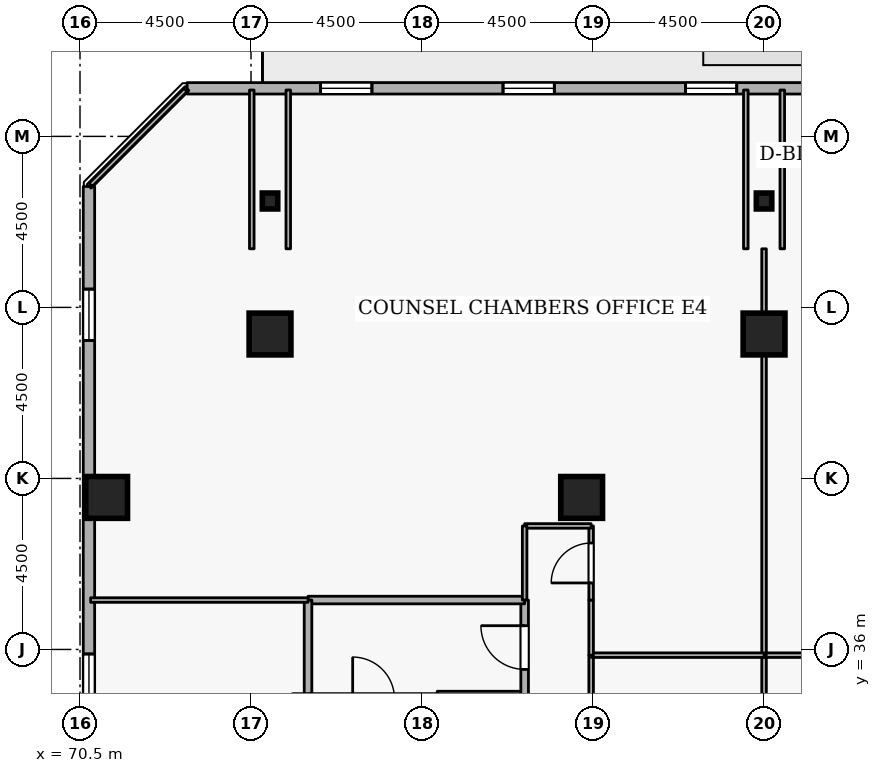
"""IFC4 building model, lengths in metres.
Left out: names, types, materials, properties, quantities, classifications, styles, units other than length and angle.
Written with IfcOpenShell. Run it as: python <this file> out.ifc"""

import sys

from ifc_helpers import new_model, si_unit, direction, frame, frame_2d, origin, origin_2d, place, context, subcontext, project, spatial, rectangle, i_section, extrude, element, fill, save


model = new_model("IFC4")
c1 = context("Model", 3, precision=1e-05, world=origin(), true_north=direction((0.0, 1.0)))
c2 = subcontext(c1, "Body", "Model", "MODEL_VIEW")
j1 = project(units=[si_unit("LENGTHUNIT", "METRE"), si_unit("PLANEANGLEUNIT", "RADIAN")], contexts=[c1])
p1 = place(None, origin())
s1 = spatial("IfcSite", under=j1, at=p1, CompositionType="ELEMENT")
p2 = place(p1, origin())
s2 = spatial("IfcBuilding", under=s1, at=p2, CompositionType="ELEMENT")
p3 = place(p2, frame((0.0, 0.0, 170.7)))
s3 = spatial("IfcBuildingStorey", under=s2, at=p3, CompositionType="ELEMENT", Elevation=170.7)
for number, where, z_axis, x_axis in (
    (1, (88.5, 44.3, 0.0), (0.0, 0.0, 1.0), (1.0, 0.0, 0.0)),
    (2, (75.5, 44.3, 0.0), (0.0, 0.0, 1.0), (1.0, 0.0, 0.0)),
    (3, (71.2, 40.0, 0.0), (0.0, 0.0, 1.0), (1.0, 0.0, 0.0)),
    (4, (83.7, 40.0, 0.0), (0.0, 0.0, 1.0), (1.0, 0.0, 0.0)),
):
    element("IfcColumn", number, at=place(p3, frame(where, z_axis=z_axis, x_axis=x_axis)), inside=s3, PredefinedType="COLUMN", context=c2, shape_type="SweptSolid", body=[
        extrude(rectangle(XDim=1.1, YDim=1.1, at=origin_2d()), origin(), (0.0, 0.0, 1.0), 3.6),
    ])
for number, where, z_axis, x_axis in (
    (5, (88.5, 47.8, 0.0), (0.0, 0.0, 1.0), (1.0, 0.0, 0.0)),
    (6, (75.5, 47.8, 0.0), (0.0, 0.0, 1.0), (1.0, 0.0, 0.0)),
):
    element("IfcColumn", number, at=place(p3, frame(where, z_axis=z_axis, x_axis=x_axis)), inside=s3, PredefinedType="COLUMN", context=c2, shape_type="SweptSolid", body=[
        extrude(i_section(OverallWidth=0.407, OverallDepth=0.419, WebThickness=0.031, FlangeThickness=0.049, FilletRadius=0.015, at=origin_2d()), origin(), (0.0, 0.0, 1.0), 3.6),
    ])
p4 = place(p3, frame((109.681, 50.765, 0.0), z_axis=(0.0, 0.0, 1.0), x_axis=(-1.0, 0.0, 0.0)))
e7 = element("IfcWall", 7, at=p4, inside=s3, PredefinedType="STANDARD", context=c2, shape_type="SweptSolid", body=[
    extrude(rectangle(XDim=36.363, YDim=0.3, at=frame_2d((18.181, 0.0))), origin(), (0.0, 0.0, 1.0), 2.22),
])
p5 = place(p4, frame((19.081, 0.0, 0.0)))
e8 = element("IfcOpeningElement", 8, at=p5, cuts=e7, PredefinedType="OPENING", context=c2, shape_type="SweptSolid", body=[
    extrude(rectangle(XDim=1.0, YDim=2.08, at=frame_2d((0.5, 1.04))), frame((0.0, 0.16, 0.0), z_axis=(0.0, -1.0, 0.0), x_axis=(1.0, 0.0, 0.0)), (0.0, 0.0, 1.0), 0.32),
])
p6 = place(p4, frame((2.7, 0.0, 0.72)))
e9 = element("IfcOpeningElement", 9, at=p6, cuts=e7, PredefinedType="OPENING", context=c2, shape_type="SweptSolid", body=[
    extrude(rectangle(XDim=1.35, YDim=1.05, at=frame_2d((0.675, 0.525))), frame((0.0, 0.16, 0.0), z_axis=(0.0, -1.0, 0.0), x_axis=(1.0, 0.0, 0.0)), (0.0, 0.0, 1.0), 0.32),
])
p7 = place(p4, frame((12.3, 0.0, 0.72)))
e10 = element("IfcOpeningElement", 10, at=p7, cuts=e7, PredefinedType="OPENING", context=c2, shape_type="SweptSolid", body=[
    extrude(rectangle(XDim=1.35, YDim=1.05, at=frame_2d((0.675, 0.525))), frame((0.0, 0.16, 0.0), z_axis=(0.0, -1.0, 0.0), x_axis=(1.0, 0.0, 0.0)), (0.0, 0.0, 1.0), 0.32),
])
p8 = place(p4, frame((17.1, 0.0, 0.72)))
e11 = element("IfcOpeningElement", 11, at=p8, cuts=e7, PredefinedType="OPENING", context=c2, shape_type="SweptSolid", body=[
    extrude(rectangle(XDim=1.35, YDim=1.05, at=frame_2d((0.675, 0.525))), frame((0.0, 0.16, 0.0), z_axis=(0.0, -1.0, 0.0), x_axis=(1.0, 0.0, 0.0)), (0.0, 0.0, 1.0), 0.32),
])
p9 = place(p4, frame((21.9, 0.0, 0.72)))
e12 = element("IfcOpeningElement", 12, at=p9, cuts=e7, PredefinedType="OPENING", context=c2, shape_type="SweptSolid", body=[
    extrude(rectangle(XDim=1.35, YDim=1.05, at=frame_2d((0.675, 0.525))), frame((0.0, 0.16, 0.0), z_axis=(0.0, -1.0, 0.0), x_axis=(1.0, 0.0, 0.0)), (0.0, 0.0, 1.0), 0.32),
])
p10 = place(p4, frame((26.7, 0.0, 0.72)))
e13 = element("IfcOpeningElement", 13, at=p10, cuts=e7, PredefinedType="OPENING", context=c2, shape_type="SweptSolid", body=[
    extrude(rectangle(XDim=1.35, YDim=1.05, at=frame_2d((0.675, 0.525))), frame((0.0, 0.16, 0.0), z_axis=(0.0, -1.0, 0.0), x_axis=(1.0, 0.0, 0.0)), (0.0, 0.0, 1.0), 0.32),
])
p11 = place(p4, frame((31.5, 0.0, 0.72)))
e14 = element("IfcOpeningElement", 14, at=p11, cuts=e7, PredefinedType="OPENING", context=c2, shape_type="SweptSolid", body=[
    extrude(rectangle(XDim=1.35, YDim=1.05, at=frame_2d((0.675, 0.525))), frame((0.0, 0.16, 0.0), z_axis=(0.0, -1.0, 0.0), x_axis=(1.0, 0.0, 0.0)), (0.0, 0.0, 1.0), 0.32),
])
p12 = place(p3, frame((70.735, 48.181, 0.0), z_axis=(0.0, 0.0, 1.0), x_axis=(0.0, -1.0, 0.0)))
e15 = element("IfcWall", 15, at=p12, inside=s3, PredefinedType="STANDARD", context=c2, shape_type="SweptSolid", body=[
    extrude(rectangle(XDim=36.363, YDim=0.3, at=frame_2d((18.181, 0.0))), origin(), (0.0, 0.0, 1.0), 2.22),
])
p13 = place(p12, frame((2.7, 0.0, 0.72)))
e16 = element("IfcOpeningElement", 16, at=p13, cuts=e15, PredefinedType="OPENING", context=c2, shape_type="SweptSolid", body=[
    extrude(rectangle(XDim=1.35, YDim=1.05, at=frame_2d((0.675, 0.525))), frame((0.0, 0.16, 0.0), z_axis=(0.0, -1.0, 0.0), x_axis=(1.0, 0.0, 0.0)), (0.0, 0.0, 1.0), 0.32),
])
p14 = place(p12, frame((12.3, 0.0, 0.72)))
e17 = element("IfcOpeningElement", 17, at=p14, cuts=e15, PredefinedType="OPENING", context=c2, shape_type="SweptSolid", body=[
    extrude(rectangle(XDim=1.35, YDim=1.05, at=frame_2d((0.675, 0.525))), frame((0.0, 0.16, 0.0), z_axis=(0.0, -1.0, 0.0), x_axis=(1.0, 0.0, 0.0)), (0.0, 0.0, 1.0), 0.32),
])
p15 = place(p12, frame((17.1, 0.0, 0.72)))
e18 = element("IfcOpeningElement", 18, at=p15, cuts=e15, PredefinedType="OPENING", context=c2, shape_type="SweptSolid", body=[
    extrude(rectangle(XDim=1.35, YDim=1.05, at=frame_2d((0.675, 0.525))), frame((0.0, 0.16, 0.0), z_axis=(0.0, -1.0, 0.0), x_axis=(1.0, 0.0, 0.0)), (0.0, 0.0, 1.0), 0.32),
])
p16 = place(p12, frame((26.7, 0.0, 0.72)))
e19 = element("IfcOpeningElement", 19, at=p16, cuts=e15, PredefinedType="OPENING", context=c2, shape_type="SweptSolid", body=[
    extrude(rectangle(XDim=1.35, YDim=1.05, at=frame_2d((0.675, 0.525))), frame((0.0, 0.16, 0.0), z_axis=(0.0, -1.0, 0.0), x_axis=(1.0, 0.0, 0.0)), (0.0, 0.0, 1.0), 0.32),
])
p17 = place(p3, frame((79.9, 34.8, 0.0), z_axis=(0.0, 0.0, 1.0), x_axis=(1.0, 0.0, 0.0)))
e20 = element("IfcWall", 20, at=p17, inside=s3, PredefinedType="STANDARD", context=c2, shape_type="SweptSolid", body=[
    extrude(rectangle(XDim=2.3, YDim=0.2, at=frame_2d((1.15, 0.0))), origin(), (0.0, 0.0, 1.0), 2.465),
])
p18 = place(p3, frame((82.2, 34.8, 0.0), z_axis=(0.0, 0.0, 1.0), x_axis=(0.0, 1.0, 0.0)))
e21 = element("IfcWall", 21, at=p18, inside=s3, PredefinedType="STANDARD", context=c2, shape_type="SweptSolid", body=[
    extrude(rectangle(XDim=2.5, YDim=0.2, at=frame_2d((1.25, 0.0))), origin(), (0.0, 0.0, 1.0), 3.26),
])
p19 = place(p18, frame((0.675, 0.0, 0.0)))
e22 = element("IfcOpeningElement", 22, at=p19, cuts=e21, PredefinedType="OPENING", context=c2, shape_type="SweptSolid", body=[
    extrude(rectangle(XDim=1.15, YDim=2.1, at=frame_2d((0.575, 1.05))), frame((0.0, 0.11, 0.0), z_axis=(0.0, -1.0, 0.0), x_axis=(1.0, 0.0, 0.0)), (0.0, 0.0, 1.0), 0.22),
])
p20 = place(p3, frame((82.2, 37.3, 0.0), z_axis=(0.0, 0.0, 1.0), x_axis=(-1.0, 0.0, 0.0)))
e23 = element("IfcWall", 23, at=p20, inside=s3, PredefinedType="STANDARD", context=c2, shape_type="SweptSolid", body=[
    extrude(rectangle(XDim=5.7, YDim=0.2, at=frame_2d((2.85, 0.0))), origin(), (0.0, 0.0, 1.0), 3.26),
])
p21 = place(p3, frame((76.5, 37.3, 0.0), z_axis=(0.0, 0.0, 1.0), x_axis=(0.0, -1.0, 0.0)))
e24 = element("IfcWall", 24, at=p21, inside=s3, PredefinedType="STANDARD", context=c2, shape_type="SweptSolid", body=[
    extrude(rectangle(XDim=2.5, YDim=0.2, at=frame_2d((1.25, 0.0))), origin(), (0.0, 0.0, 1.0), 3.26),
])
p22 = place(p3, frame((88.5, 33.95, 0.0), z_axis=(0.0, 0.0, 1.0), x_axis=(0.0, 1.0, 0.0)))
e25 = element("IfcWall", 25, at=p22, inside=s3, PredefinedType="PARTITIONING", context=c2, shape_type="SweptSolid", body=[
    extrude(rectangle(XDim=1.9, YDim=0.12, at=frame_2d((0.95, 0.0))), origin(), (0.0, 0.0, 1.0), 1.785),
])
p23 = place(p3, frame((88.5, 35.85, 0.0), z_axis=(0.0, 0.0, 1.0), x_axis=(1.0, 0.0, 0.0)))
e26 = element("IfcWall", 26, at=p23, inside=s3, PredefinedType="PARTITIONING", context=c2, shape_type="SweptSolid", body=[
    extrude(rectangle(XDim=4.55, YDim=0.12, at=frame_2d((2.275, 0.0))), origin(), (0.0, 0.0, 1.0), 3.26),
])
p24 = place(p3, frame((88.5, 35.85, 0.0), z_axis=(0.0, 0.0, 1.0), x_axis=(0.0, 1.0, 0.0)))
e27 = element("IfcWall", 27, at=p24, inside=s3, PredefinedType="PARTITIONING", context=c2, shape_type="SweptSolid", body=[
    extrude(rectangle(XDim=10.692, YDim=0.12, at=frame_2d((5.346, 0.0))), origin(), (0.0, 0.0, 1.0), 1.785),
])
p25 = place(p3, frame((88.98, 46.542, 0.0), z_axis=(0.0, 0.0, 1.0), x_axis=(0.0, 1.0, 0.0)))
e28 = element("IfcWall", 28, at=p25, inside=s3, PredefinedType="PARTITIONING", context=c2, shape_type="SweptSolid", body=[
    extrude(rectangle(XDim=4.178, YDim=0.12, at=frame_2d((2.089, 0.0))), origin(), (0.0, 0.0, 1.0), 1.785),
])
p26 = place(p3, frame((83.95, 33.95, 0.0), z_axis=(0.0, 0.0, 1.0), x_axis=(0.0, 1.0, 0.0)))
e29 = element("IfcWall", 29, at=p26, inside=s3, PredefinedType="PARTITIONING", context=c2, shape_type="SweptSolid", body=[
    extrude(rectangle(XDim=1.9, YDim=0.12, at=frame_2d((0.95, 0.0))), origin(), (0.0, 0.0, 1.0), 3.26),
])
p27 = place(p3, frame((83.95, 35.85, 0.0), z_axis=(0.0, 0.0, 1.0), x_axis=(1.0, 0.0, 0.0)))
e30 = element("IfcWall", 30, at=p27, inside=s3, PredefinedType="PARTITIONING", context=c2, shape_type="SweptSolid", body=[
    extrude(rectangle(XDim=4.55, YDim=0.12, at=frame_2d((2.275, 0.0))), origin(), (0.0, 0.0, 1.0), 3.26),
])
p28 = place(p3, frame((83.95, 35.85, 0.0), z_axis=(0.0, 0.0, 1.0), x_axis=(0.0, 1.0, 0.0)))
e31 = element("IfcWall", 31, at=p28, inside=s3, PredefinedType="PARTITIONING", context=c2, shape_type="SweptSolid", body=[
    extrude(rectangle(XDim=1.45, YDim=0.12, at=frame_2d((0.725, 0.0))), origin(), (0.0, 0.0, 1.0), 3.26),
])
p29 = place(p3, frame((83.95, 37.3, 0.0), z_axis=(0.0, 0.0, 1.0), x_axis=(0.0, 1.0, 0.0)))
e32 = element("IfcWall", 32, at=p29, inside=s3, PredefinedType="PARTITIONING", context=c2, shape_type="SweptSolid", body=[
    extrude(rectangle(XDim=1.95, YDim=0.12, at=frame_2d((0.975, 0.0))), origin(), (0.0, 0.0, 1.0), 3.26),
])
p30 = place(p29, frame((0.45, 0.0, 0.0)))
e33 = element("IfcOpeningElement", 33, at=p30, cuts=e32, PredefinedType="OPENING", context=c2, shape_type="SweptSolid", body=[
    extrude(rectangle(XDim=1.05, YDim=2.1, at=frame_2d((0.525, 1.05))), frame((0.0, 0.07, 0.0), z_axis=(0.0, -1.0, 0.0), x_axis=(1.0, 0.0, 0.0)), (0.0, 0.0, 1.0), 0.14),
])
p31 = place(p3, frame((83.95, 39.25, 0.0), z_axis=(0.0, 0.0, 1.0), x_axis=(-1.0, 0.0, 0.0)))
e34 = element("IfcWall", 34, at=p31, inside=s3, PredefinedType="PARTITIONING", context=c2, shape_type="SweptSolid", body=[
    extrude(rectangle(XDim=1.75, YDim=0.12, at=frame_2d((0.875, 0.0))), origin(), (0.0, 0.0, 1.0), 3.26),
])
p32 = place(p3, frame((82.2, 39.25, 0.0), z_axis=(0.0, 0.0, 1.0), x_axis=(0.0, -1.0, 0.0)))
e35 = element("IfcWall", 35, at=p32, inside=s3, PredefinedType="PARTITIONING", context=c2, shape_type="SweptSolid", body=[
    extrude(rectangle(XDim=1.95, YDim=0.12, at=frame_2d((0.975, 0.0))), origin(), (0.0, 0.0, 1.0), 3.26),
])
p33 = place(p3, frame((76.5, 37.3, 0.0), z_axis=(0.0, 0.0, 1.0), x_axis=(-1.0, 0.0, 0.0)))
e36 = element("IfcWall", 36, at=p33, inside=s3, PredefinedType="PARTITIONING", context=c2, shape_type="SweptSolid", body=[
    extrude(rectangle(XDim=5.72, YDim=0.12, at=frame_2d((2.86, 0.0))), origin(), (0.0, 0.0, 1.0), 3.26),
])
p34 = place(p3, frame((70.78, 48.225, 0.0), z_axis=(0.0, 0.0, 1.0), x_axis=(0.707106781187, 0.707106781187, 0.0)))
e37 = element("IfcWall", 37, at=p34, inside=s3, PredefinedType="PARTITIONING", context=c2, shape_type="SweptSolid", body=[
    extrude(rectangle(XDim=3.528, YDim=0.12, at=frame_2d((1.764, 0.0))), origin(), (0.0, 0.0, 1.0), 3.26),
])
for number, where, z_axis, x_axis in (
    (38, (75.02, 50.72, 0.0), (0.0, 0.0, 1.0), (0.0, -1.0, 0.0)),
    (39, (75.98, 46.542, 0.0), (0.0, 0.0, 1.0), (0.0, 1.0, 0.0)),
    (40, (88.02, 50.72, 0.0), (0.0, 0.0, 1.0), (0.0, -1.0, 0.0)),
):
    element("IfcWall", number, at=place(p3, frame(where, z_axis=z_axis, x_axis=x_axis)), inside=s3, PredefinedType="PARTITIONING", context=c2, shape_type="SweptSolid", body=[
        extrude(rectangle(XDim=4.178, YDim=0.12, at=frame_2d((2.089, 0.0))), origin(), (0.0, 0.0, 1.0), 1.785),
    ])
p35 = place(p9, origin())
e41 = element("IfcWindow", 41, at=p35, inside=s3, PartitioningType="SINGLE_PANEL", PredefinedType="WINDOW", context=c2, shape_type="SweptSolid", body=[
    extrude(rectangle(XDim=1.35, YDim=1.05, at=frame_2d((0.675, 0.525))), frame((0.0, 0.03, 0.0), z_axis=(0.0, -1.0, 0.0), x_axis=(1.0, 0.0, 0.0)), (0.0, 0.0, 1.0), 0.06),
])
fill(e12, e41)
p36 = place(p10, origin())
e42 = element("IfcWindow", 42, at=p36, inside=s3, PartitioningType="SINGLE_PANEL", PredefinedType="WINDOW", context=c2, shape_type="SweptSolid", body=[
    extrude(rectangle(XDim=1.35, YDim=1.05, at=frame_2d((0.675, 0.525))), frame((0.0, 0.03, 0.0), z_axis=(0.0, -1.0, 0.0), x_axis=(1.0, 0.0, 0.0)), (0.0, 0.0, 1.0), 0.06),
])
fill(e13, e42)
p37 = place(p11, origin())
e43 = element("IfcWindow", 43, at=p37, inside=s3, PartitioningType="SINGLE_PANEL", PredefinedType="WINDOW", context=c2, shape_type="SweptSolid", body=[
    extrude(rectangle(XDim=1.35, YDim=1.05, at=frame_2d((0.675, 0.525))), frame((0.0, 0.03, 0.0), z_axis=(0.0, -1.0, 0.0), x_axis=(1.0, 0.0, 0.0)), (0.0, 0.0, 1.0), 0.06),
])
fill(e14, e43)
p38 = place(p13, origin())
e44 = element("IfcWindow", 44, at=p38, inside=s3, PartitioningType="SINGLE_PANEL", PredefinedType="WINDOW", context=c2, shape_type="SweptSolid", body=[
    extrude(rectangle(XDim=1.35, YDim=1.05, at=frame_2d((0.675, 0.525))), frame((0.0, 0.03, 0.0), z_axis=(0.0, -1.0, 0.0), x_axis=(1.0, 0.0, 0.0)), (0.0, 0.0, 1.0), 0.06),
])
fill(e16, e44)
p39 = place(p14, origin())
e45 = element("IfcWindow", 45, at=p39, inside=s3, PartitioningType="SINGLE_PANEL", PredefinedType="WINDOW", context=c2, shape_type="SweptSolid", body=[
    extrude(rectangle(XDim=1.35, YDim=1.05, at=frame_2d((0.675, 0.525))), frame((0.0, 0.03, 0.0), z_axis=(0.0, -1.0, 0.0), x_axis=(1.0, 0.0, 0.0)), (0.0, 0.0, 1.0), 0.06),
])
fill(e17, e45)
p40 = place(p19, origin())
e46 = element("IfcDoor", 46, at=p40, inside=s3, OperationType="SINGLE_SWING_RIGHT", PredefinedType="DOOR", context=c2, shape_type="SweptSolid", body=[
    extrude(rectangle(XDim=1.15, YDim=2.1, at=frame_2d((0.575, 1.05))), frame((0.0, 0.025, 0.0), z_axis=(0.0, -1.0, 0.0), x_axis=(1.0, 0.0, 0.0)), (0.0, 0.0, 1.0), 0.05),
])
fill(e22, e46)
p41 = place(p30, origin())
e47 = element("IfcDoor", 47, at=p41, inside=s3, OperationType="SINGLE_SWING_LEFT", PredefinedType="DOOR", context=c2, shape_type="SweptSolid", body=[
    extrude(rectangle(XDim=1.05, YDim=2.1, at=frame_2d((0.525, 1.05))), frame((0.0, 0.025, 0.0), z_axis=(0.0, -1.0, 0.0), x_axis=(1.0, 0.0, 0.0)), (0.0, 0.0, 1.0), 0.05),
])
fill(e33, e47)
save(model, sys.argv[1])
